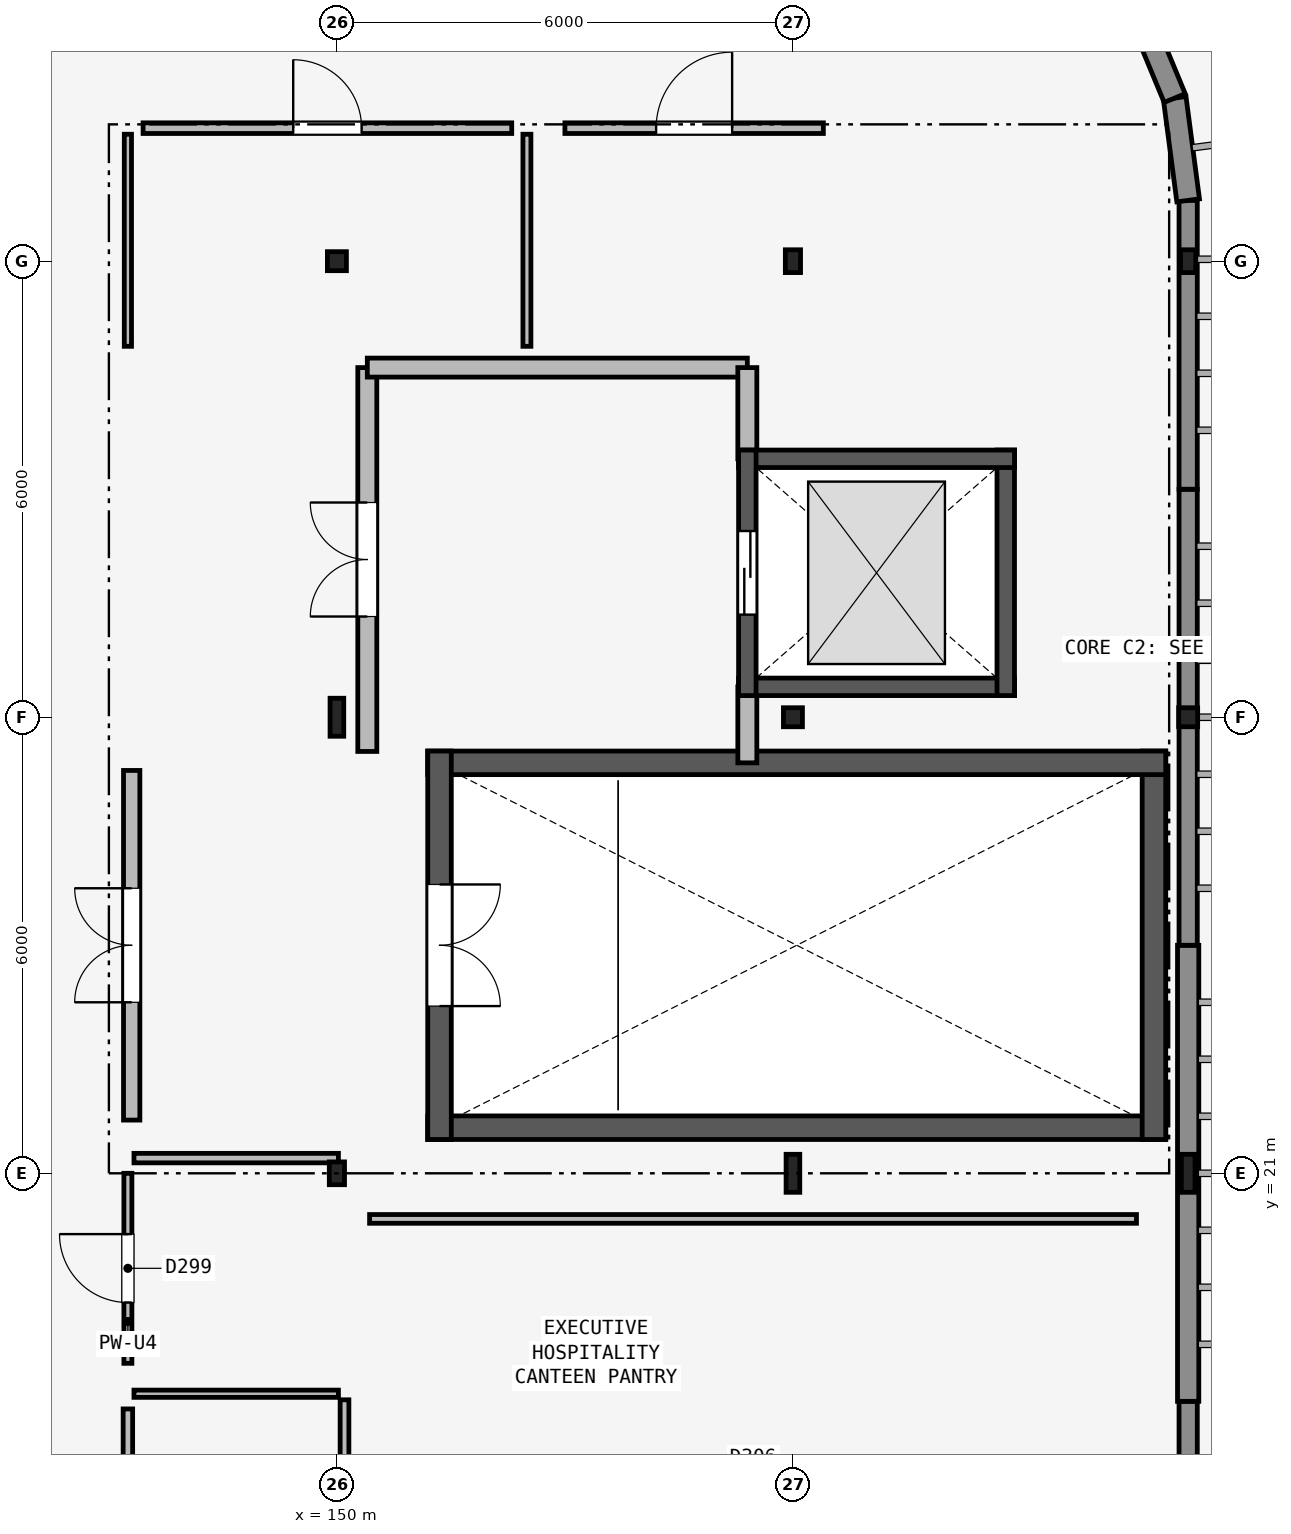
"""IFC4 building model, lengths in metres.
Left out: names, types, materials, properties, quantities, classifications, styles, units other than length and angle.
Written with IfcOpenShell. Run it as: python <this file> out.ifc"""

import sys

from ifc_helpers import new_model, si_unit, direction, frame, frame_2d, origin, origin_2d, place, context, subcontext, project, spatial, rectangle, hollow_rectangle, i_section, extrude, element, fill, save


model = new_model("IFC4")
c1 = context("Model", 3, precision=1e-05, world=origin(), true_north=direction((0.0, 1.0)))
c2 = subcontext(c1, "Body", "Model", "MODEL_VIEW")
j1 = project(units=[si_unit("LENGTHUNIT", "METRE"), si_unit("PLANEANGLEUNIT", "RADIAN")], contexts=[c1])
p1 = place(None, origin())
s1 = spatial("IfcSite", under=j1, at=p1, CompositionType="ELEMENT")
p2 = place(p1, origin())
s2 = spatial("IfcBuilding", under=s1, at=p2, CompositionType="ELEMENT")
p3 = place(p2, frame((0.0, 0.0, 30.0)))
s3 = spatial("IfcBuildingStorey", under=s2, at=p3, CompositionType="ELEMENT", Elevation=30.0)
p4 = place(p3, frame((150.0, 21.0, 0.0), z_axis=(0.0, 0.0, 1.0), x_axis=(1.0, 0.0, 0.0)))
e1 = element("IfcColumn", 1, at=p4, inside=s3, PredefinedType="COLUMN", context=c2, shape_type="SweptSolid", body=[
    extrude(hollow_rectangle(XDim=0.2, YDim=0.3, WallThickness=0.012, InnerFilletRadius=0.012, OuterFilletRadius=0.024, at=origin_2d()), origin(), (0.0, 0.0, 1.0), 4.2),
])
p5 = place(p3, frame((150.0, 27.0, 0.0), z_axis=(0.0, 0.0, 1.0), x_axis=(1.0, 0.0, 0.0)))
e2 = element("IfcColumn", 2, at=p5, inside=s3, PredefinedType="COLUMN", context=c2, shape_type="SweptSolid", body=[
    extrude(i_section(OverallWidth=0.18, OverallDepth=0.5, WebThickness=0.01, FlangeThickness=0.017, FilletRadius=0.017, at=origin_2d()), origin(), (0.0, 0.0, 1.0), 4.2),
])
p6 = place(p3, frame((150.0, 33.0, 0.0), z_axis=(0.0, 0.0, 1.0), x_axis=(1.0, 0.0, 0.0)))
e3 = element("IfcColumn", 3, at=p6, inside=s3, PredefinedType="COLUMN", context=c2, shape_type="SweptSolid", body=[
    extrude(hollow_rectangle(XDim=0.25, YDim=0.25, WallThickness=0.012, InnerFilletRadius=0.012, OuterFilletRadius=0.024, at=origin_2d()), origin(), (0.0, 0.0, 1.0), 4.2),
])
p7 = place(p3, frame((156.0, 21.0, 0.0), z_axis=(0.0, 0.0, 1.0), x_axis=(1.0, 0.0, 0.0)))
e4 = element("IfcColumn", 4, at=p7, inside=s3, PredefinedType="COLUMN", context=c2, shape_type="SweptSolid", body=[
    extrude(i_section(OverallWidth=0.18, OverallDepth=0.5, WebThickness=0.01, FlangeThickness=0.017, FilletRadius=0.017, at=origin_2d()), origin(), (0.0, 0.0, 1.0), 4.2),
])
p8 = place(p3, frame((156.0, 27.0, 0.0), z_axis=(0.0, 0.0, 1.0), x_axis=(1.0, 0.0, 0.0)))
e5 = element("IfcColumn", 5, at=p8, inside=s3, PredefinedType="COLUMN", context=c2, shape_type="SweptSolid", body=[
    extrude(hollow_rectangle(XDim=0.25, YDim=0.25, WallThickness=0.012, InnerFilletRadius=0.012, OuterFilletRadius=0.024, at=origin_2d()), origin(), (0.0, 0.0, 1.0), 4.2),
])
p9 = place(p3, frame((156.0, 33.0, 0.0), z_axis=(0.0, 0.0, 1.0), x_axis=(1.0, 0.0, 0.0)))
e6 = element("IfcColumn", 6, at=p9, inside=s3, PredefinedType="COLUMN", context=c2, shape_type="SweptSolid", body=[
    extrude(hollow_rectangle(XDim=0.2, YDim=0.3, WallThickness=0.012, InnerFilletRadius=0.012, OuterFilletRadius=0.024, at=origin_2d()), origin(), (0.0, 0.0, 1.0), 4.2),
])
p10 = place(p3, frame((161.2, 21.0, 0.0), z_axis=(0.0, 0.0, 1.0), x_axis=(1.0, 0.0, 0.0)))
e7 = element("IfcColumn", 7, at=p10, inside=s3, PredefinedType="COLUMN", context=c2, shape_type="SweptSolid", body=[
    extrude(i_section(OverallWidth=0.18, OverallDepth=0.5, WebThickness=0.01, FlangeThickness=0.017, FilletRadius=0.017, at=origin_2d()), origin(), (0.0, 0.0, 1.0), 4.2),
])
p11 = place(p3, frame((161.2, 27.0, 0.0), z_axis=(0.0, 0.0, 1.0), x_axis=(1.0, 0.0, 0.0)))
e8 = element("IfcColumn", 8, at=p11, inside=s3, PredefinedType="COLUMN", context=c2, shape_type="SweptSolid", body=[
    extrude(hollow_rectangle(XDim=0.25, YDim=0.25, WallThickness=0.012, InnerFilletRadius=0.012, OuterFilletRadius=0.024, at=origin_2d()), origin(), (0.0, 0.0, 1.0), 4.2),
])
p12 = place(p3, frame((161.2, 33.0, 0.0), z_axis=(0.0, 0.0, 1.0), x_axis=(1.0, 0.0, 0.0)))
e9 = element("IfcColumn", 9, at=p12, inside=s3, PredefinedType="COLUMN", context=c2, shape_type="SweptSolid", body=[
    extrude(hollow_rectangle(XDim=0.2, YDim=0.3, WallThickness=0.012, InnerFilletRadius=0.012, OuterFilletRadius=0.024, at=origin_2d()), origin(), (0.0, 0.0, 1.0), 4.2),
])
p13 = place(p3, frame((161.2, 12.0, 0.0), z_axis=(0.0, 0.0, 1.0), x_axis=(0.0, 1.0, 0.0)))
e10 = element("IfcWall", 10, at=p13, inside=s3, PredefinedType="SOLIDWALL", context=c2, shape_type="SweptSolid", body=[
    extrude(rectangle(XDim=6.0, YDim=0.24, at=frame_2d((3.0, 0.0))), origin(), (0.0, 0.0, 1.0), 3.53),
])
p14 = place(p3, frame((161.2, 18.0, 0.0), z_axis=(0.0, 0.0, 1.0), x_axis=(0.0, 1.0, 0.0)))
e11 = element("IfcWall", 11, at=p14, inside=s3, PredefinedType="SOLIDWALL", context=c2, shape_type="SweptSolid", body=[
    extrude(rectangle(XDim=6.0, YDim=0.28, at=frame_2d((3.0, 0.0))), origin(), (0.0, 0.0, 1.0), 3.53),
])
p15 = place(p3, frame((161.2, 24.0, 0.0), z_axis=(0.0, 0.0, 1.0), x_axis=(0.0, 1.0, 0.0)))
e12 = element("IfcWall", 12, at=p15, inside=s3, PredefinedType="SOLIDWALL", context=c2, shape_type="SweptSolid", body=[
    extrude(rectangle(XDim=6.0, YDim=0.24, at=frame_2d((3.0, 0.0))), origin(), (0.0, 0.0, 1.0), 3.58),
])
p16 = place(p3, frame((161.2, 30.0, 0.0), z_axis=(0.0, 0.0, 1.0), x_axis=(0.0, 1.0, 0.0)))
e13 = element("IfcWall", 13, at=p16, inside=s3, PredefinedType="SOLIDWALL", context=c2, shape_type="SweptSolid", body=[
    extrude(rectangle(XDim=3.8, YDim=0.24, at=frame_2d((1.9, 0.0))), origin(), (0.0, 0.0, 1.0), 3.58),
])
p17 = place(p3, frame((161.2, 33.8, 0.0), z_axis=(0.0, 0.0, 1.0), x_axis=(-0.130561507967, 0.991440211328, 0.0)))
e14 = element("IfcWall", 14, at=p17, inside=s3, PredefinedType="SOLIDWALL", context=c2, shape_type="SweptSolid", body=[
    extrude(rectangle(XDim=1.358, YDim=0.3, at=frame_2d((0.679, 0.0))), origin(), (0.0, 0.0, 1.0), 3.624),
])
p18 = place(p3, frame((161.023, 35.146, 0.0), z_axis=(0.0, 0.0, 1.0), x_axis=(-0.382621882407, 0.923905024937, 0.0)))
e15 = element("IfcWall", 15, at=p18, inside=s3, PredefinedType="SOLIDWALL", context=c2, shape_type="SweptSolid", body=[
    extrude(rectangle(XDim=1.357, YDim=0.3, at=frame_2d((0.679, 0.0))), origin(), (0.0, 0.0, 1.0), 3.624),
])
p19 = place(p3, frame((151.195, 21.6, 0.0), z_axis=(0.0, 0.0, 1.0), x_axis=(1.0, 0.0, 0.0)))
e16 = element("IfcWall", 16, at=p19, inside=s3, PredefinedType="SHEAR", context=c2, shape_type="SweptSolid", body=[
    extrude(rectangle(XDim=9.71, YDim=0.31, at=frame_2d((4.855, 0.0))), origin(), (0.0, 0.0, 1.0), 4.06),
])
p20 = place(p3, frame((160.75, 21.445, 0.0), z_axis=(0.0, 0.0, 1.0), x_axis=(0.0, 1.0, 0.0)))
e17 = element("IfcWall", 17, at=p20, inside=s3, PredefinedType="SHEAR", context=c2, shape_type="SweptSolid", body=[
    extrude(rectangle(XDim=5.11, YDim=0.31, at=frame_2d((2.555, 0.0))), origin(), (0.0, 0.0, 1.0), 4.06),
])
p21 = place(p3, frame((160.905, 26.4, 0.0), z_axis=(0.0, 0.0, 1.0), x_axis=(-1.0, 0.0, 0.0)))
e18 = element("IfcWall", 18, at=p21, inside=s3, PredefinedType="SHEAR", context=c2, shape_type="SweptSolid", body=[
    extrude(rectangle(XDim=9.71, YDim=0.31, at=frame_2d((4.855, 0.0))), origin(), (0.0, 0.0, 1.0), 4.06),
])
p22 = place(p3, frame((151.35, 26.555, 0.0), z_axis=(0.0, 0.0, 1.0), x_axis=(0.0, -1.0, 0.0)))
e19 = element("IfcWall", 19, at=p22, inside=s3, PredefinedType="SHEAR", context=c2, shape_type="SweptSolid", body=[
    extrude(rectangle(XDim=5.11, YDim=0.31, at=frame_2d((2.555, 0.0))), origin(), (0.0, 0.0, 1.0), 4.06),
])
p23 = place(p22, frame((1.755, 0.0, 0.0)))
e20 = element("IfcOpeningElement", 20, at=p23, cuts=e19, PredefinedType="OPENING", context=c2, shape_type="SweptSolid", body=[
    extrude(rectangle(XDim=1.6, YDim=2.2, at=frame_2d((0.8, 1.1))), frame((0.0, 0.165, 0.0), z_axis=(0.0, -1.0, 0.0), x_axis=(1.0, 0.0, 0.0)), (0.0, 0.0, 1.0), 0.33),
])
p24 = place(p3, frame((147.3, 21.7, 0.0), z_axis=(0.0, 0.0, 1.0), x_axis=(0.0, 1.0, 0.0)))
e21 = element("IfcWall", 21, at=p24, inside=s3, PredefinedType="PARTITIONING", context=c2, shape_type="SweptSolid", body=[
    extrude(rectangle(XDim=4.6, YDim=0.215, at=frame_2d((2.3, 0.0))), origin(), (0.0, 0.0, 1.0), 4.03),
])
p25 = place(p24, frame((1.55, 0.0, 0.0)))
e22 = element("IfcOpeningElement", 22, at=p25, cuts=e21, PredefinedType="OPENING", context=c2, shape_type="SweptSolid", body=[
    extrude(rectangle(XDim=1.5, YDim=2.15, at=frame_2d((0.75, 1.075))), frame((0.0, 0.117, 0.0), z_axis=(0.0, -1.0, 0.0), x_axis=(1.0, 0.0, 0.0)), (0.0, 0.0, 1.0), 0.235),
])
p26 = place(p3, frame((150.4, 26.55, 0.0), z_axis=(0.0, 0.0, 1.0), x_axis=(0.0, 1.0, 0.0)))
e23 = element("IfcWall", 23, at=p26, inside=s3, PredefinedType="PARTITIONING", context=c2, shape_type="SweptSolid", body=[
    extrude(rectangle(XDim=5.05, YDim=0.25, at=frame_2d((2.525, 0.0))), origin(), (0.0, 0.0, 1.0), 3.48),
])
p27 = place(p26, frame((1.775, 0.0, 0.0)))
e24 = element("IfcOpeningElement", 24, at=p27, cuts=e23, PredefinedType="OPENING", context=c2, shape_type="SweptSolid", body=[
    extrude(rectangle(XDim=1.5, YDim=2.15, at=frame_2d((0.75, 1.075))), frame((0.0, 0.135, 0.0), z_axis=(0.0, -1.0, 0.0), x_axis=(1.0, 0.0, 0.0)), (0.0, 0.0, 1.0), 0.27),
])
p28 = place(p3, frame((150.4, 31.6, 0.0), z_axis=(0.0, 0.0, 1.0), x_axis=(1.0, 0.0, 0.0)))
e25 = element("IfcWall", 25, at=p28, inside=s3, PredefinedType="PARTITIONING", context=c2, shape_type="SweptSolid", body=[
    extrude(rectangle(XDim=5.0, YDim=0.25, at=frame_2d((2.5, 0.0))), origin(), (0.0, 0.0, 1.0), 3.68),
])
p29 = place(p3, frame((155.4, 30.4, 0.0), z_axis=(0.0, 0.0, 1.0), x_axis=(0.0, 1.0, 0.0)))
e26 = element("IfcWall", 26, at=p29, inside=s3, PredefinedType="PARTITIONING", context=c2, shape_type="SweptSolid", body=[
    extrude(rectangle(XDim=1.2, YDim=0.25, at=frame_2d((0.6, 0.0))), origin(), (0.0, 0.0, 1.0), 4.03),
])
p30 = place(p3, frame((155.4, 26.4, 0.0), z_axis=(0.0, 0.0, 1.0), x_axis=(0.0, 1.0, 0.0)))
e27 = element("IfcWall", 27, at=p30, inside=s3, PredefinedType="PARTITIONING", context=c2, shape_type="SweptSolid", body=[
    extrude(rectangle(XDim=1.0, YDim=0.25, at=frame_2d((0.5, 0.0))), origin(), (0.0, 0.0, 1.0), 3.48),
])
p31 = place(p3, frame((155.285, 27.4, 0.0), z_axis=(0.0, 0.0, 1.0), x_axis=(1.0, 0.0, 0.0)))
e28 = element("IfcWall", 28, at=p31, inside=s3, PredefinedType="SHEAR", context=c2, shape_type="SweptSolid", body=[
    extrude(rectangle(XDim=3.63, YDim=0.23, at=frame_2d((1.815, 0.0))), origin(), (0.0, 0.0, 1.0), 4.2),
])
p32 = place(p3, frame((158.8, 27.285, 0.0), z_axis=(0.0, 0.0, 1.0), x_axis=(0.0, 1.0, 0.0)))
e29 = element("IfcWall", 29, at=p32, inside=s3, PredefinedType="SHEAR", context=c2, shape_type="SweptSolid", body=[
    extrude(rectangle(XDim=3.23, YDim=0.23, at=frame_2d((1.615, 0.0))), origin(), (0.0, 0.0, 1.0), 4.2),
])
p33 = place(p3, frame((158.915, 30.4, 0.0), z_axis=(0.0, 0.0, 1.0), x_axis=(-1.0, 0.0, 0.0)))
e30 = element("IfcWall", 30, at=p33, inside=s3, PredefinedType="SHEAR", context=c2, shape_type="SweptSolid", body=[
    extrude(rectangle(XDim=3.63, YDim=0.23, at=frame_2d((1.815, 0.0))), origin(), (0.0, 0.0, 1.0), 4.2),
])
p34 = place(p3, frame((155.4, 30.515, 0.0), z_axis=(0.0, 0.0, 1.0), x_axis=(0.0, -1.0, 0.0)))
e31 = element("IfcWall", 31, at=p34, inside=s3, PredefinedType="SHEAR", context=c2, shape_type="SweptSolid", body=[
    extrude(rectangle(XDim=3.23, YDim=0.23, at=frame_2d((1.615, 0.0))), origin(), (0.0, 0.0, 1.0), 4.2),
])
p35 = place(p34, frame((1.065, 0.0, 0.0)))
e32 = element("IfcOpeningElement", 32, at=p35, cuts=e31, PredefinedType="OPENING", context=c2, shape_type="SweptSolid", body=[
    extrude(rectangle(XDim=1.1, YDim=2.2, at=frame_2d((0.55, 1.1))), frame((0.0, 0.125, 0.0), z_axis=(0.0, -1.0, 0.0), x_axis=(1.0, 0.0, 0.0)), (0.0, 0.0, 1.0), 0.25),
])
p36 = place(p3, frame((147.25, 15.4, 0.0), z_axis=(0.0, 0.0, 1.0), x_axis=(0.0, 1.0, 0.0)))
e33 = element("IfcWall", 33, at=p36, inside=s3, PredefinedType="PARTITIONING", context=c2, shape_type="SweptSolid", body=[
    extrude(rectangle(XDim=2.5, YDim=0.125, at=frame_2d((1.25, 0.0))), origin(), (0.0, 0.0, 1.0), 4.03),
])
p37 = place(p36, frame((0.75, 0.0, 0.0)))
e34 = element("IfcOpeningElement", 34, at=p37, cuts=e33, PredefinedType="OPENING", context=c2, shape_type="SweptSolid", body=[
    extrude(rectangle(XDim=1.0, YDim=2.1, at=frame_2d((0.5, 1.05))), frame((0.0, 0.073, 0.0), z_axis=(0.0, -1.0, 0.0), x_axis=(1.0, 0.0, 0.0)), (0.0, 0.0, 1.0), 0.145),
])
p38 = place(p3, frame((147.25, 18.5, 0.0), z_axis=(0.0, 0.0, 1.0), x_axis=(0.0, 1.0, 0.0)))
e35 = element("IfcWall", 35, at=p38, inside=s3, PredefinedType="PARTITIONING", context=c2, shape_type="SweptSolid", body=[
    extrude(rectangle(XDim=2.5, YDim=0.105, at=frame_2d((1.25, 0.0))), origin(), (0.0, 0.0, 1.0), 3.43),
])
p39 = place(p38, frame((0.8, 0.0, 0.0)))
e36 = element("IfcOpeningElement", 36, at=p39, cuts=e35, PredefinedType="OPENING", context=c2, shape_type="SweptSolid", body=[
    extrude(rectangle(XDim=0.9, YDim=2.1, at=frame_2d((0.45, 1.05))), frame((0.0, 0.062, 0.0), z_axis=(0.0, -1.0, 0.0), x_axis=(1.0, 0.0, 0.0)), (0.0, 0.0, 1.0), 0.125),
])
p40 = place(p3, frame((147.45, 34.75, 0.0), z_axis=(0.0, 0.0, 1.0), x_axis=(1.0, 0.0, 0.0)))
e37 = element("IfcWall", 37, at=p40, inside=s3, PredefinedType="PARTITIONING", context=c2, shape_type="SweptSolid", body=[
    extrude(rectangle(XDim=4.85, YDim=0.14, at=frame_2d((2.425, 0.0))), origin(), (0.0, 0.0, 1.0), 3.624),
])
p41 = place(p40, frame((1.975, 0.0, 0.0)))
e38 = element("IfcOpeningElement", 38, at=p41, cuts=e37, PredefinedType="OPENING", context=c2, shape_type="SweptSolid", body=[
    extrude(rectangle(XDim=0.9, YDim=2.1, at=frame_2d((0.45, 1.05))), frame((0.0, 0.08, 0.0), z_axis=(0.0, -1.0, 0.0), x_axis=(1.0, 0.0, 0.0)), (0.0, 0.0, 1.0), 0.16),
])
p42 = place(p3, frame((153.0, 34.75, 0.0), z_axis=(0.0, 0.0, 1.0), x_axis=(1.0, 0.0, 0.0)))
e39 = element("IfcWall", 39, at=p42, inside=s3, PredefinedType="PARTITIONING", context=c2, shape_type="SweptSolid", body=[
    extrude(rectangle(XDim=3.4, YDim=0.14, at=frame_2d((1.7, 0.0))), origin(), (0.0, 0.0, 1.0), 3.624),
])
p43 = place(p42, frame((1.2, 0.0, 0.0)))
e40 = element("IfcOpeningElement", 40, at=p43, cuts=e39, PredefinedType="OPENING", context=c2, shape_type="SweptSolid", body=[
    extrude(rectangle(XDim=1.0, YDim=2.15, at=frame_2d((0.5, 1.075))), frame((0.0, 0.08, 0.0), z_axis=(0.0, -1.0, 0.0), x_axis=(1.0, 0.0, 0.0)), (0.0, 0.0, 1.0), 0.16),
])
p44 = place(p3, frame((150.1, 18.02, 0.0), z_axis=(0.0, 0.0, 1.0), x_axis=(0.0, -1.0, 0.0)))
e41 = element("IfcWall", 41, at=p44, inside=s3, PredefinedType="PARTITIONING", context=c2, shape_type="SweptSolid", body=[
    extrude(rectangle(XDim=2.74, YDim=0.115, at=frame_2d((1.37, 0.0))), origin(), (0.0, 0.0, 1.0), 3.53),
])
p45 = place(p3, frame((147.33, 18.1, 0.0), z_axis=(0.0, 0.0, 1.0), x_axis=(1.0, 0.0, 0.0)))
e42 = element("IfcWall", 42, at=p45, inside=s3, PredefinedType="PARTITIONING", context=c2, shape_type="SweptSolid", body=[
    extrude(rectangle(XDim=2.69, YDim=0.095, at=frame_2d((1.345, 0.0))), origin(), (0.0, 0.0, 1.0), 3.53),
])
p46 = place(p3, frame((147.33, 21.2, 0.0), z_axis=(0.0, 0.0, 1.0), x_axis=(1.0, 0.0, 0.0)))
e43 = element("IfcWall", 43, at=p46, inside=s3, PredefinedType="PARTITIONING", context=c2, shape_type="SweptSolid", body=[
    extrude(rectangle(XDim=2.69, YDim=0.125, at=frame_2d((1.345, 0.0))), origin(), (0.0, 0.0, 1.0), 3.43),
])
p47 = place(p3, frame((152.5, 34.67, 0.0), z_axis=(0.0, 0.0, 1.0), x_axis=(0.0, -1.0, 0.0)))
e44 = element("IfcWall", 44, at=p47, inside=s3, PredefinedType="PARTITIONING", context=c2, shape_type="SweptSolid", body=[
    extrude(rectangle(XDim=2.79, YDim=0.105, at=frame_2d((1.395, 0.0))), origin(), (0.0, 0.0, 1.0), 3.48),
])
p48 = place(p3, frame((147.25, 31.88, 0.0), z_axis=(0.0, 0.0, 1.0), x_axis=(0.0, 1.0, 0.0)))
e45 = element("IfcWall", 45, at=p48, inside=s3, PredefinedType="PARTITIONING", context=c2, shape_type="SweptSolid", body=[
    extrude(rectangle(XDim=2.79, YDim=0.095, at=frame_2d((1.395, 0.0))), origin(), (0.0, 0.0, 1.0), 3.43),
])
p49 = place(p3, frame((150.43, 20.4, 0.0), z_axis=(0.0, 0.0, 1.0), x_axis=(1.0, 0.0, 0.0)))
e46 = element("IfcWall", 46, at=p49, inside=s3, PredefinedType="PARTITIONING", context=c2, shape_type="SweptSolid", body=[
    extrude(rectangle(XDim=10.09, YDim=0.115, at=frame_2d((5.045, 0.0))), origin(), (0.0, 0.0, 1.0), 3.53),
])
p50 = place(p23, origin())
e47 = element("IfcDoor", 47, at=p50, inside=s3, OperationType="DOUBLE_DOOR_SINGLE_SWING", PredefinedType="DOOR", context=c2, shape_type="SweptSolid", body=[
    extrude(rectangle(XDim=1.6, YDim=2.2, at=frame_2d((0.8, 1.1))), frame((0.0, 0.025, 0.0), z_axis=(0.0, -1.0, 0.0), x_axis=(1.0, 0.0, 0.0)), (0.0, 0.0, 1.0), 0.05),
])
fill(e20, e47)
p51 = place(p25, origin())
e48 = element("IfcDoor", 48, at=p51, inside=s3, OperationType="DOUBLE_DOOR_SINGLE_SWING", PredefinedType="DOOR", context=c2, shape_type="SweptSolid", body=[
    extrude(rectangle(XDim=1.5, YDim=2.15, at=frame_2d((0.75, 1.075))), frame((0.0, 0.025, 0.0), z_axis=(0.0, -1.0, 0.0), x_axis=(1.0, 0.0, 0.0)), (0.0, 0.0, 1.0), 0.05),
])
fill(e22, e48)
p52 = place(p27, origin())
e49 = element("IfcDoor", 49, at=p52, inside=s3, OperationType="DOUBLE_DOOR_SINGLE_SWING", PredefinedType="DOOR", context=c2, shape_type="SweptSolid", body=[
    extrude(rectangle(XDim=1.5, YDim=2.15, at=frame_2d((0.75, 1.075))), frame((0.0, 0.025, 0.0), z_axis=(0.0, -1.0, 0.0), x_axis=(1.0, 0.0, 0.0)), (0.0, 0.0, 1.0), 0.05),
])
fill(e24, e49)
p53 = place(p35, origin())
e50 = element("IfcDoor", 50, at=p53, inside=s3, OperationType="SLIDING_TO_LEFT", PredefinedType="DOOR", context=c2, shape_type="SweptSolid", body=[
    extrude(rectangle(XDim=1.1, YDim=2.2, at=frame_2d((0.55, 1.1))), frame((0.0, 0.025, 0.0), z_axis=(0.0, -1.0, 0.0), x_axis=(1.0, 0.0, 0.0)), (0.0, 0.0, 1.0), 0.05),
])
fill(e32, e50)
p54 = place(p39, origin())
e51 = element("IfcDoor", 51, at=p54, inside=s3, OperationType="SINGLE_SWING_RIGHT", PredefinedType="DOOR", context=c2, shape_type="SweptSolid", body=[
    extrude(rectangle(XDim=0.9, YDim=2.1, at=frame_2d((0.45, 1.05))), frame((0.0, 0.025, 0.0), z_axis=(0.0, -1.0, 0.0), x_axis=(1.0, 0.0, 0.0)), (0.0, 0.0, 1.0), 0.05),
])
fill(e36, e51)
p55 = place(p41, origin())
e52 = element("IfcDoor", 52, at=p55, inside=s3, OperationType="SINGLE_SWING_LEFT", PredefinedType="DOOR", context=c2, shape_type="SweptSolid", body=[
    extrude(rectangle(XDim=0.9, YDim=2.1, at=frame_2d((0.45, 1.05))), frame((0.0, 0.025, 0.0), z_axis=(0.0, -1.0, 0.0), x_axis=(1.0, 0.0, 0.0)), (0.0, 0.0, 1.0), 0.05),
])
fill(e38, e52)
p56 = place(p43, origin())
e53 = element("IfcDoor", 53, at=p56, inside=s3, OperationType="SINGLE_SWING_RIGHT", PredefinedType="DOOR", context=c2, shape_type="SweptSolid", body=[
    extrude(rectangle(XDim=1.0, YDim=2.15, at=frame_2d((0.5, 1.075))), frame((0.0, 0.025, 0.0), z_axis=(0.0, -1.0, 0.0), x_axis=(1.0, 0.0, 0.0)), (0.0, 0.0, 1.0), 0.05),
])
fill(e40, e53)
save(model, sys.argv[1])
